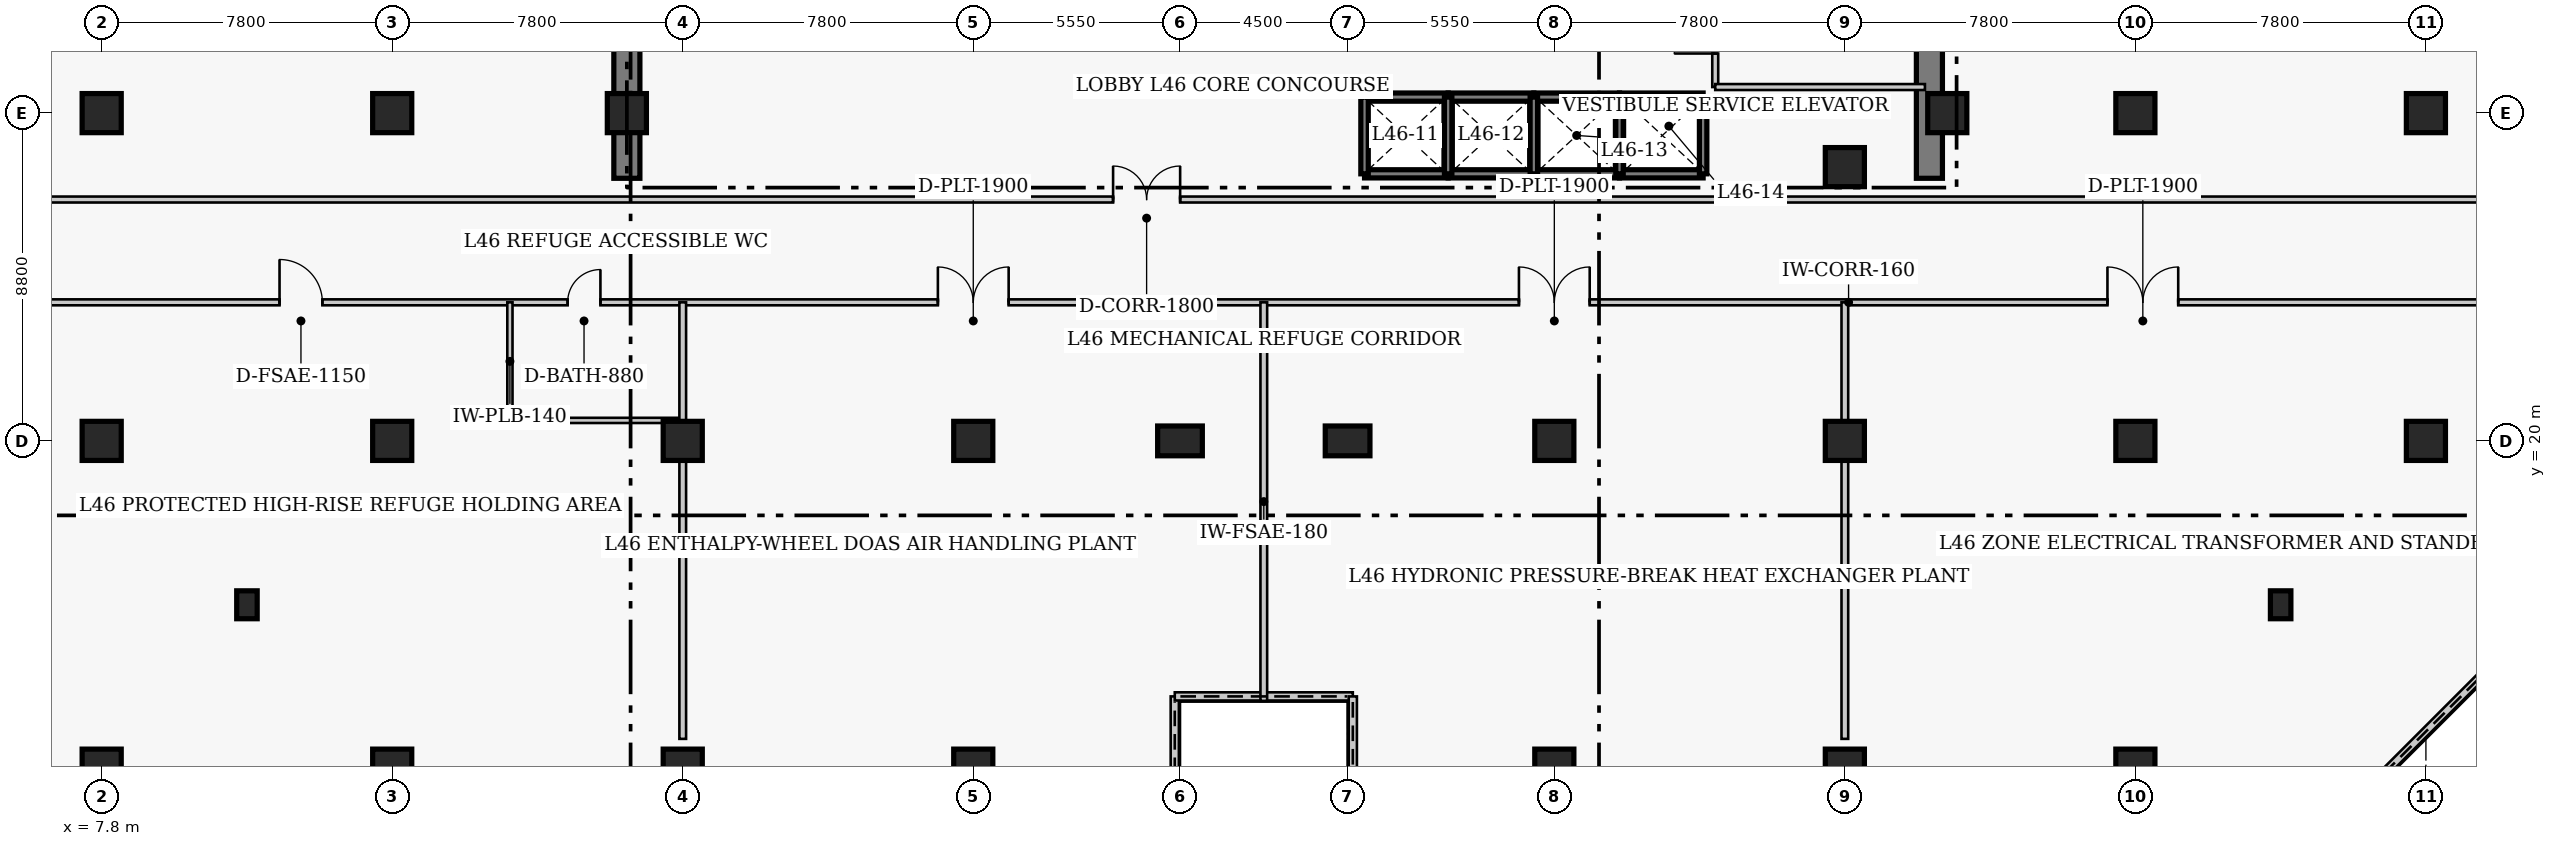
"""IFC4 building model, lengths in metres.
Left out: names, types, materials, properties, quantities, classifications, styles, units other than length and angle.
Written with IfcOpenShell. Run it as: python <this file> out.ifc"""

import sys

from ifc_helpers import new_model, si_unit, direction, frame, frame_2d, origin, origin_2d, place, context, subcontext, project, spatial, rectangle, extrude, element, fill, save


model = new_model("IFC4")
c1 = context("Model", 3, precision=1e-05, world=origin(), true_north=direction((0.0, 1.0)))
c2 = subcontext(c1, "Body", "Model", "MODEL_VIEW")
j1 = project(units=[si_unit("LENGTHUNIT", "METRE"), si_unit("PLANEANGLEUNIT", "RADIAN")], contexts=[c1])
p1 = place(None, origin())
s1 = spatial("IfcSite", under=j1, at=p1, CompositionType="ELEMENT")
p2 = place(p1, origin())
s2 = spatial("IfcBuilding", under=s1, at=p2, CompositionType="ELEMENT")
p3 = place(p2, frame((0.0, 0.0, 184.0)))
s3 = spatial("IfcBuildingStorey", under=s2, at=p3, CompositionType="ELEMENT", Elevation=184.0)
for number, where, z_axis, x_axis in (
    (1, (21.9, 27.05, 0.0), (0.0, 0.0, 1.0), (0.0, 1.0, 0.0)),
    (2, (56.87, 27.05, 0.0), (0.0, 0.0, 1.0), (0.0, 1.0, 0.0)),
):
    element("IfcWall", number, at=place(p3, frame(where, z_axis=z_axis, x_axis=x_axis)), inside=s3, PredefinedType="SHEAR", context=c2, shape_type="SweptSolid", body=[
        extrude(rectangle(XDim=13.62, YDim=0.7, at=frame_2d((6.81, 0.0))), origin(), (0.0, 0.0, 1.0), 5.0),
    ])
for number, where, z_axis, x_axis in (
    (3, (7.8, 11.2, 0.0), (0.0, 0.0, 1.0), (1.0, 0.0, 0.0)),
    (4, (7.8, 20.0, 0.0), (0.0, 0.0, 1.0), (1.0, 0.0, 0.0)),
    (5, (7.8, 28.8, 0.0), (0.0, 0.0, 1.0), (1.0, 0.0, 0.0)),
    (6, (15.6, 11.2, 0.0), (0.0, 0.0, 1.0), (1.0, 0.0, 0.0)),
    (7, (15.6, 20.0, 0.0), (0.0, 0.0, 1.0), (1.0, 0.0, 0.0)),
    (8, (15.6, 28.8, 0.0), (0.0, 0.0, 1.0), (1.0, 0.0, 0.0)),
    (9, (23.4, 11.2, 0.0), (0.0, 0.0, 1.0), (1.0, 0.0, 0.0)),
    (10, (23.4, 20.0, 0.0), (0.0, 0.0, 1.0), (1.0, 0.0, 0.0)),
    (11, (31.2, 11.2, 0.0), (0.0, 0.0, 1.0), (1.0, 0.0, 0.0)),
    (12, (31.2, 20.0, 0.0), (0.0, 0.0, 1.0), (1.0, 0.0, 0.0)),
):
    element("IfcColumn", number, at=place(p3, frame(where, z_axis=z_axis, x_axis=x_axis)), inside=s3, PredefinedType="COLUMN", context=c2, shape_type="SweptSolid", body=[
        extrude(rectangle(XDim=1.05, YDim=1.05, at=origin_2d()), origin(), (0.0, 0.0, 1.0), 5.0),
    ])
for number, where, z_axis, x_axis in (
    (13, (36.75, 20.0, 0.0), (0.0, 0.0, 1.0), (1.0, 0.0, 0.0)),
    (14, (41.25, 20.0, 0.0), (0.0, 0.0, 1.0), (1.0, 0.0, 0.0)),
):
    element("IfcColumn", number, at=place(p3, frame(where, z_axis=z_axis, x_axis=x_axis)), inside=s3, PredefinedType="COLUMN", context=c2, shape_type="SweptSolid", body=[
        extrude(rectangle(XDim=1.2, YDim=0.8, at=origin_2d()), origin(), (0.0, 0.0, 1.0), 5.0),
    ])
for number, where, z_axis, x_axis in (
    (15, (46.8, 11.2, 0.0), (0.0, 0.0, 1.0), (1.0, 0.0, 0.0)),
    (16, (46.8, 20.0, 0.0), (0.0, 0.0, 1.0), (1.0, 0.0, 0.0)),
    (17, (54.6, 11.2, 0.0), (0.0, 0.0, 1.0), (1.0, 0.0, 0.0)),
    (18, (54.6, 20.0, 0.0), (0.0, 0.0, 1.0), (1.0, 0.0, 0.0)),
    (19, (62.4, 11.2, 0.0), (0.0, 0.0, 1.0), (1.0, 0.0, 0.0)),
    (20, (62.4, 20.0, 0.0), (0.0, 0.0, 1.0), (1.0, 0.0, 0.0)),
    (21, (62.4, 28.8, 0.0), (0.0, 0.0, 1.0), (1.0, 0.0, 0.0)),
    (22, (70.2, 20.0, 0.0), (0.0, 0.0, 1.0), (1.0, 0.0, 0.0)),
    (23, (70.2, 28.8, 0.0), (0.0, 0.0, 1.0), (1.0, 0.0, 0.0)),
    (24, (21.9, 28.8, 0.0), (0.0, 0.0, 1.0), (1.0, 0.0, 0.0)),
    (25, (57.35, 28.8, 0.0), (0.0, 0.0, 1.0), (1.0, 0.0, 0.0)),
    (26, (54.6, 27.35, 0.0), (0.0, 0.0, 1.0), (1.0, 0.0, 0.0)),
):
    element("IfcColumn", number, at=place(p3, frame(where, z_axis=z_axis, x_axis=x_axis)), inside=s3, PredefinedType="COLUMN", context=c2, shape_type="SweptSolid", body=[
        extrude(rectangle(XDim=1.05, YDim=1.05, at=origin_2d()), origin(), (0.0, 0.0, 1.0), 5.0),
    ])
for number, where, z_axis, x_axis in (
    (27, (11.7, 15.6, 0.0), (0.0, 0.0, 1.0), (1.0, 0.0, 0.0)),
    (28, (66.3, 15.6, 0.0), (0.0, 0.0, 1.0), (1.0, 0.0, 0.0)),
):
    element("IfcColumn", number, at=place(p3, frame(where, z_axis=z_axis, x_axis=x_axis)), inside=s3, PredefinedType="PILASTER", context=c2, shape_type="SweptSolid", body=[
        extrude(rectangle(XDim=0.55, YDim=0.75, at=origin_2d()), origin(), (0.0, 0.0, 1.0), 5.0),
    ])
p4 = place(p3, frame((36.61, 5.26, 0.0), z_axis=(0.0, 0.0, 1.0), x_axis=(0.0, 1.0, 0.0)))
e29 = element("IfcWall", 29, at=p4, inside=s3, PredefinedType="PARAPET", context=c2, shape_type="SweptSolid", body=[
    extrude(rectangle(XDim=7.88, YDim=0.22, at=frame_2d((3.94, 0.0))), origin(), (0.0, 0.0, 1.0), 1.15),
])
p5 = place(p3, frame((36.61, 13.14, 0.0), z_axis=(0.0, 0.0, 1.0), x_axis=(1.0, 0.0, 0.0)))
e30 = element("IfcWall", 30, at=p5, inside=s3, PredefinedType="PARAPET", context=c2, shape_type="SweptSolid", body=[
    extrude(rectangle(XDim=4.78, YDim=0.22, at=frame_2d((2.39, 0.0))), origin(), (0.0, 0.0, 1.0), 1.15),
])
p6 = place(p3, frame((41.39, 13.14, 0.0), z_axis=(0.0, 0.0, 1.0), x_axis=(0.0, -1.0, 0.0)))
e31 = element("IfcWall", 31, at=p6, inside=s3, PredefinedType="PARAPET", context=c2, shape_type="SweptSolid", body=[
    extrude(rectangle(XDim=2.68, YDim=0.22, at=frame_2d((1.34, 0.0))), origin(), (0.0, 0.0, 1.0), 1.15),
])
p7 = place(p3, frame((68.073, 10.071, 0.0), z_axis=(0.0, 0.0, 1.0), x_axis=(0.707106781187, 0.707106781187, 0.0)))
e32 = element("IfcWall", 32, at=p7, inside=s3, PredefinedType="PARAPET", context=c2, shape_type="SweptSolid", body=[
    extrude(rectangle(XDim=6.02, YDim=0.22, at=frame_2d((3.01, 0.0))), origin(), (0.0, 0.0, 1.0), 1.15),
])
for number, where, z_axis, x_axis in (
    (33, (41.705, 29.23, 0.0), (0.0, 0.0, 1.0), (1.0, 0.0, 0.0)),
    (34, (41.705, 27.17, 0.0), (0.0, 0.0, 1.0), (1.0, 0.0, 0.0)),
):
    element("IfcWall", number, at=place(p3, frame(where, z_axis=z_axis, x_axis=x_axis)), inside=s3, PredefinedType="SHEAR", context=c2, shape_type="SweptSolid", body=[
        extrude(rectangle(XDim=2.245, YDim=0.22, at=frame_2d((1.123, 0.0))), origin(), (0.0, 0.0, 1.0), 5.0),
    ])
p8 = place(p3, frame((41.705, 27.17, 0.0), z_axis=(0.0, 0.0, 1.0), x_axis=(0.0, 1.0, 0.0)))
e35 = element("IfcWall", 35, at=p8, inside=s3, PredefinedType="SHEAR", context=c2, shape_type="SweptSolid", body=[
    extrude(rectangle(XDim=2.06, YDim=0.2, at=frame_2d((1.03, 0.0))), origin(), (0.0, 0.0, 1.0), 5.0),
])
for number, where, z_axis, x_axis in (
    (36, (43.95, 29.23, 0.0), (0.0, 0.0, 1.0), (1.0, 0.0, 0.0)),
    (37, (43.95, 27.17, 0.0), (0.0, 0.0, 1.0), (1.0, 0.0, 0.0)),
):
    element("IfcWall", number, at=place(p3, frame(where, z_axis=z_axis, x_axis=x_axis)), inside=s3, PredefinedType="SHEAR", context=c2, shape_type="SweptSolid", body=[
        extrude(rectangle(XDim=2.3, YDim=0.22, at=frame_2d((1.15, 0.0))), origin(), (0.0, 0.0, 1.0), 5.0),
    ])
p9 = place(p3, frame((43.95, 27.17, 0.0), z_axis=(0.0, 0.0, 1.0), x_axis=(0.0, 1.0, 0.0)))
e38 = element("IfcWall", 38, at=p9, inside=s3, PredefinedType="SHEAR", context=c2, shape_type="SweptSolid", body=[
    extrude(rectangle(XDim=2.06, YDim=0.2, at=frame_2d((1.03, 0.0))), origin(), (0.0, 0.0, 1.0), 5.0),
])
for number, where, z_axis, x_axis in (
    (39, (46.25, 29.23, 0.0), (0.0, 0.0, 1.0), (1.0, 0.0, 0.0)),
    (40, (46.25, 27.17, 0.0), (0.0, 0.0, 1.0), (1.0, 0.0, 0.0)),
):
    element("IfcWall", number, at=place(p3, frame(where, z_axis=z_axis, x_axis=x_axis)), inside=s3, PredefinedType="SHEAR", context=c2, shape_type="SweptSolid", body=[
        extrude(rectangle(XDim=2.3, YDim=0.22, at=frame_2d((1.15, 0.0))), origin(), (0.0, 0.0, 1.0), 5.0),
    ])
p10 = place(p3, frame((46.25, 27.17, 0.0), z_axis=(0.0, 0.0, 1.0), x_axis=(0.0, 1.0, 0.0)))
e41 = element("IfcWall", 41, at=p10, inside=s3, PredefinedType="SHEAR", context=c2, shape_type="SweptSolid", body=[
    extrude(rectangle(XDim=2.06, YDim=0.2, at=frame_2d((1.03, 0.0))), origin(), (0.0, 0.0, 1.0), 5.0),
])
for number, where, z_axis, x_axis in (
    (42, (48.55, 29.23, 0.0), (0.0, 0.0, 1.0), (1.0, 0.0, 0.0)),
    (43, (48.55, 27.17, 0.0), (0.0, 0.0, 1.0), (1.0, 0.0, 0.0)),
):
    element("IfcWall", number, at=place(p3, frame(where, z_axis=z_axis, x_axis=x_axis)), inside=s3, PredefinedType="SHEAR", context=c2, shape_type="SweptSolid", body=[
        extrude(rectangle(XDim=2.245, YDim=0.22, at=frame_2d((1.123, 0.0))), origin(), (0.0, 0.0, 1.0), 5.0),
    ])
for number, where, z_axis, x_axis in (
    (44, (48.55, 27.17, 0.0), (0.0, 0.0, 1.0), (0.0, 1.0, 0.0)),
    (45, (50.795, 27.17, 0.0), (0.0, 0.0, 1.0), (0.0, 1.0, 0.0)),
):
    element("IfcWall", number, at=place(p3, frame(where, z_axis=z_axis, x_axis=x_axis)), inside=s3, PredefinedType="SHEAR", context=c2, shape_type="SweptSolid", body=[
        extrude(rectangle(XDim=2.06, YDim=0.2, at=frame_2d((1.03, 0.0))), origin(), (0.0, 0.0, 1.0), 5.0),
    ])
p11 = place(p3, frame((51.12, 29.5, 0.0), z_axis=(0.0, 0.0, 1.0), x_axis=(0.0, 1.0, 0.0)))
e46 = element("IfcWall", 46, at=p11, inside=s3, PredefinedType="PARTITIONING", context=c2, shape_type="SweptSolid", body=[
    extrude(rectangle(XDim=3.7, YDim=0.16, at=frame_2d((1.85, 0.0))), origin(), (0.0, 0.0, 1.0), 4.75),
])
p12 = place(p11, frame((0.9, 0.0, 0.0)))
e47 = element("IfcOpeningElement", 47, at=p12, cuts=e46, PredefinedType="OPENING", context=c2, shape_type="SweptSolid", body=[
    extrude(rectangle(XDim=1.1, YDim=2.15, at=frame_2d((0.55, 1.075))), frame((0.0, 0.09, 0.0), z_axis=(0.0, -1.0, 0.0), x_axis=(1.0, 0.0, 0.0)), (0.0, 0.0, 1.0), 0.18),
])
p13 = place(p3, frame((51.12, 29.5, 0.0), z_axis=(0.0, 0.0, 1.0), x_axis=(1.0, 0.0, 0.0)))
e48 = element("IfcWall", 48, at=p13, inside=s3, PredefinedType="PARTITIONING", context=c2, shape_type="SweptSolid", body=[
    extrude(rectangle(XDim=5.63, YDim=0.16, at=frame_2d((2.815, 0.0))), origin(), (0.0, 0.0, 1.0), 4.75),
])
p14 = place(p3, frame((6.2, 23.72, 0.0), z_axis=(0.0, 0.0, 1.0), x_axis=(1.0, 0.0, 0.0)))
e49 = element("IfcWall", 49, at=p14, inside=s3, PredefinedType="PARTITIONING", context=c2, shape_type="SweptSolid", body=[
    extrude(rectangle(XDim=65.6, YDim=0.16, at=frame_2d((32.8, 0.0))), origin(), (0.0, 0.0, 1.0), 4.75),
])
p15 = place(p14, frame((14.11, 0.0, 0.0)))
e50 = element("IfcOpeningElement", 50, at=p15, cuts=e49, PredefinedType="OPENING", context=c2, shape_type="SweptSolid", body=[
    extrude(rectangle(XDim=0.88, YDim=2.05, at=frame_2d((0.44, 1.025))), frame((0.0, 0.09, 0.0), z_axis=(0.0, -1.0, 0.0), x_axis=(1.0, 0.0, 0.0)), (0.0, 0.0, 1.0), 0.18),
])
p16 = place(p14, frame((6.375, 0.0, 0.0)))
e51 = element("IfcOpeningElement", 51, at=p16, cuts=e49, PredefinedType="OPENING", context=c2, shape_type="SweptSolid", body=[
    extrude(rectangle(XDim=1.15, YDim=2.15, at=frame_2d((0.575, 1.075))), frame((0.0, 0.09, 0.0), z_axis=(0.0, -1.0, 0.0), x_axis=(1.0, 0.0, 0.0)), (0.0, 0.0, 1.0), 0.18),
])
p17 = place(p14, frame((24.05, 0.0, 0.0)))
e52 = element("IfcOpeningElement", 52, at=p17, cuts=e49, PredefinedType="OPENING", context=c2, shape_type="SweptSolid", body=[
    extrude(rectangle(XDim=1.9, YDim=2.25, at=frame_2d((0.95, 1.125))), frame((0.0, 0.09, 0.0), z_axis=(0.0, -1.0, 0.0), x_axis=(1.0, 0.0, 0.0)), (0.0, 0.0, 1.0), 0.18),
])
p18 = place(p14, frame((39.65, 0.0, 0.0)))
e53 = element("IfcOpeningElement", 53, at=p18, cuts=e49, PredefinedType="OPENING", context=c2, shape_type="SweptSolid", body=[
    extrude(rectangle(XDim=1.9, YDim=2.25, at=frame_2d((0.95, 1.125))), frame((0.0, 0.09, 0.0), z_axis=(0.0, -1.0, 0.0), x_axis=(1.0, 0.0, 0.0)), (0.0, 0.0, 1.0), 0.18),
])
p19 = place(p14, frame((55.45, 0.0, 0.0)))
e54 = element("IfcOpeningElement", 54, at=p19, cuts=e49, PredefinedType="OPENING", context=c2, shape_type="SweptSolid", body=[
    extrude(rectangle(XDim=1.9, YDim=2.25, at=frame_2d((0.95, 1.125))), frame((0.0, 0.09, 0.0), z_axis=(0.0, -1.0, 0.0), x_axis=(1.0, 0.0, 0.0)), (0.0, 0.0, 1.0), 0.18),
])
p20 = place(p3, frame((6.2, 26.48, 0.0), z_axis=(0.0, 0.0, 1.0), x_axis=(1.0, 0.0, 0.0)))
e55 = element("IfcWall", 55, at=p20, inside=s3, PredefinedType="PARTITIONING", context=c2, shape_type="SweptSolid", body=[
    extrude(rectangle(XDim=65.6, YDim=0.16, at=frame_2d((32.8, 0.0))), origin(), (0.0, 0.0, 1.0), 4.75),
])
p21 = place(p20, frame((28.754, 0.0, 0.0)))
e56 = element("IfcOpeningElement", 56, at=p21, cuts=e55, PredefinedType="OPENING", context=c2, shape_type="SweptSolid", body=[
    extrude(rectangle(XDim=1.8, YDim=2.2, at=frame_2d((0.9, 1.1))), frame((0.0, 0.09, 0.0), z_axis=(0.0, -1.0, 0.0), x_axis=(1.0, 0.0, 0.0)), (0.0, 0.0, 1.0), 0.18),
])
p22 = place(p3, frame((18.76, 20.55, 0.0), z_axis=(0.0, 0.0, 1.0), x_axis=(0.0, 1.0, 0.0)))
e57 = element("IfcWall", 57, at=p22, inside=s3, PredefinedType="PLUMBINGWALL", context=c2, shape_type="SweptSolid", body=[
    extrude(rectangle(XDim=3.17, YDim=0.14, at=frame_2d((1.585, 0.0))), origin(), (0.0, 0.0, 1.0), 4.75),
])
p23 = place(p3, frame((18.76, 20.55, 0.0), z_axis=(0.0, 0.0, 1.0), x_axis=(1.0, 0.0, 0.0)))
e58 = element("IfcWall", 58, at=p23, inside=s3, PredefinedType="PLUMBINGWALL", context=c2, shape_type="SweptSolid", body=[
    extrude(rectangle(XDim=4.64, YDim=0.14, at=frame_2d((2.32, 0.0))), origin(), (0.0, 0.0, 1.0), 4.75),
])
p24 = place(p3, frame((23.4, 12.0, 0.0), z_axis=(0.0, 0.0, 1.0), x_axis=(0.0, 1.0, 0.0)))
e59 = element("IfcWall", 59, at=p24, inside=s3, PredefinedType="PARTITIONING", context=c2, shape_type="SweptSolid", body=[
    extrude(rectangle(XDim=11.72, YDim=0.18, at=frame_2d((5.86, 0.0))), origin(), (0.0, 0.0, 1.0), 3.938),
])
p25 = place(p3, frame((39.0, 13.02, 0.0), z_axis=(0.0, 0.0, 1.0), x_axis=(0.0, 1.0, 0.0)))
e60 = element("IfcWall", 60, at=p25, inside=s3, PredefinedType="PARTITIONING", context=c2, shape_type="SweptSolid", body=[
    extrude(rectangle(XDim=10.7, YDim=0.18, at=frame_2d((5.35, 0.0))), origin(), (0.0, 0.0, 1.0), 4.75),
])
p26 = place(p3, frame((54.6, 12.0, 0.0), z_axis=(0.0, 0.0, 1.0), x_axis=(0.0, 1.0, 0.0)))
e61 = element("IfcWall", 61, at=p26, inside=s3, PredefinedType="PARTITIONING", context=c2, shape_type="SweptSolid", body=[
    extrude(rectangle(XDim=11.72, YDim=0.18, at=frame_2d((5.86, 0.0))), origin(), (0.0, 0.0, 1.0), 3.938),
])
p27 = place(p12, origin())
e62 = element("IfcDoor", 62, at=p27, inside=s3, OperationType="SINGLE_SWING_LEFT", PredefinedType="DOOR", context=c2, shape_type="SweptSolid", body=[
    extrude(rectangle(XDim=1.1, YDim=2.15, at=frame_2d((0.55, 1.075))), frame((0.0, 0.025, 0.0), z_axis=(0.0, -1.0, 0.0), x_axis=(1.0, 0.0, 0.0)), (0.0, 0.0, 1.0), 0.05),
])
fill(e47, e62)
p28 = place(p21, origin())
e63 = element("IfcDoor", 63, at=p28, inside=s3, OperationType="DOUBLE_DOOR_SINGLE_SWING", PredefinedType="DOOR", context=c2, shape_type="SweptSolid", body=[
    extrude(rectangle(XDim=1.8, YDim=2.2, at=frame_2d((0.9, 1.1))), frame((0.0, 0.025, 0.0), z_axis=(0.0, -1.0, 0.0), x_axis=(1.0, 0.0, 0.0)), (0.0, 0.0, 1.0), 0.05),
])
fill(e56, e63)
p29 = place(p15, origin())
e64 = element("IfcDoor", 64, at=p29, inside=s3, OperationType="SINGLE_SWING_RIGHT", PredefinedType="DOOR", context=c2, shape_type="SweptSolid", body=[
    extrude(rectangle(XDim=0.88, YDim=2.05, at=frame_2d((0.44, 1.025))), frame((0.0, 0.025, 0.0), z_axis=(0.0, -1.0, 0.0), x_axis=(1.0, 0.0, 0.0)), (0.0, 0.0, 1.0), 0.05),
])
fill(e50, e64)
p30 = place(p16, origin())
e65 = element("IfcDoor", 65, at=p30, inside=s3, OperationType="SINGLE_SWING_LEFT", PredefinedType="DOOR", context=c2, shape_type="SweptSolid", body=[
    extrude(rectangle(XDim=1.15, YDim=2.15, at=frame_2d((0.575, 1.075))), frame((0.0, 0.025, 0.0), z_axis=(0.0, -1.0, 0.0), x_axis=(1.0, 0.0, 0.0)), (0.0, 0.0, 1.0), 0.05),
])
fill(e51, e65)
p31 = place(p17, origin())
e66 = element("IfcDoor", 66, at=p31, inside=s3, OperationType="DOUBLE_DOOR_SINGLE_SWING", PredefinedType="DOOR", context=c2, shape_type="SweptSolid", body=[
    extrude(rectangle(XDim=1.9, YDim=2.25, at=frame_2d((0.95, 1.125))), frame((0.0, 0.025, 0.0), z_axis=(0.0, -1.0, 0.0), x_axis=(1.0, 0.0, 0.0)), (0.0, 0.0, 1.0), 0.05),
])
fill(e52, e66)
p32 = place(p18, origin())
e67 = element("IfcDoor", 67, at=p32, inside=s3, OperationType="DOUBLE_DOOR_SINGLE_SWING", PredefinedType="DOOR", context=c2, shape_type="SweptSolid", body=[
    extrude(rectangle(XDim=1.9, YDim=2.25, at=frame_2d((0.95, 1.125))), frame((0.0, 0.025, 0.0), z_axis=(0.0, -1.0, 0.0), x_axis=(1.0, 0.0, 0.0)), (0.0, 0.0, 1.0), 0.05),
])
fill(e53, e67)
p33 = place(p19, origin())
e68 = element("IfcDoor", 68, at=p33, inside=s3, OperationType="DOUBLE_DOOR_SINGLE_SWING", PredefinedType="DOOR", context=c2, shape_type="SweptSolid", body=[
    extrude(rectangle(XDim=1.9, YDim=2.25, at=frame_2d((0.95, 1.125))), frame((0.0, 0.025, 0.0), z_axis=(0.0, -1.0, 0.0), x_axis=(1.0, 0.0, 0.0)), (0.0, 0.0, 1.0), 0.05),
])
fill(e54, e68)
save(model, sys.argv[1])
